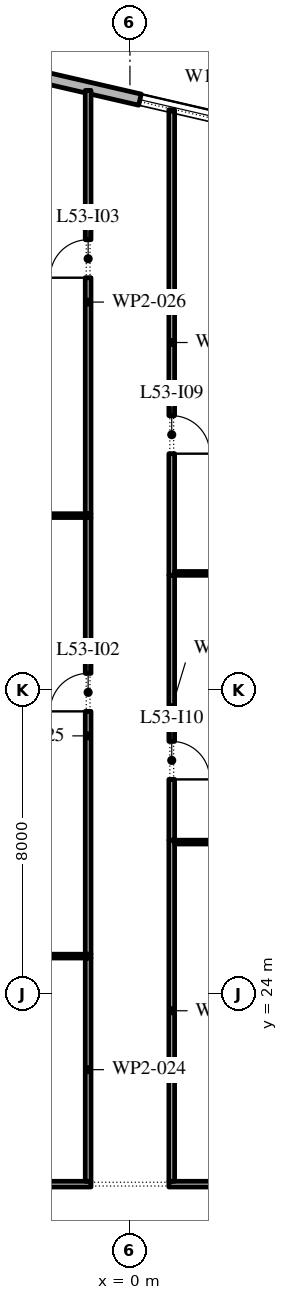
"""IFC4 building model, lengths in metres.
Left out: names, types, materials, properties, quantities, classifications, styles, units other than length and angle.
Written with IfcOpenShell. Run it as: python <this file> out.ifc"""

import sys

from ifc_helpers import new_model, si_unit, direction, frame, frame_2d, origin, place, context, subcontext, project, spatial, rectangle, extrude, element, fill, save


model = new_model("IFC4")
c1 = context("Model", 3, precision=1e-05, world=origin(), true_north=direction((0.0, 1.0)))
c2 = subcontext(c1, "Body", "Model", "MODEL_VIEW")
j1 = project(units=[si_unit("LENGTHUNIT", "METRE"), si_unit("PLANEANGLEUNIT", "RADIAN")], contexts=[c1])
p1 = place(None, origin())
s1 = spatial("IfcSite", under=j1, at=p1, CompositionType="ELEMENT")
p2 = place(p1, origin())
s2 = spatial("IfcBuilding", under=s1, at=p2, CompositionType="ELEMENT")
p3 = place(p2, frame((0.0, 0.0, 247.2)))
s3 = spatial("IfcBuildingStorey", under=s2, at=p3, CompositionType="ELEMENT", Elevation=247.2)
p4 = place(p3, frame((29.616, 40.758, 0.0), z_axis=(0.0, 0.0, 1.0), x_axis=(-0.974370532314, 0.224949029246, 0.0)))
e1 = element("IfcWall", 1, at=p4, inside=s3, PredefinedType="STANDARD", context=c2, shape_type="SweptSolid", body=[
    extrude(rectangle(XDim=48.0, YDim=0.3, at=frame_2d((24.0, 0.0))), origin(), (0.0, 0.0, 1.0), 4.0),
])
p5 = place(p4, frame((1.625, 0.0, 0.45)))
e2 = element("IfcOpeningElement", 2, at=p5, cuts=e1, PredefinedType="OPENING", context=c2, shape_type="SweptSolid", body=[
    extrude(rectangle(XDim=4.5, YDim=2.675, at=frame_2d((2.25, 1.337))), frame((0.0, 0.16, 0.0), z_axis=(0.0, -1.0, 0.0), x_axis=(1.0, 0.0, 0.0)), (0.0, 0.0, 1.0), 0.32),
])
p6 = place(p4, frame((9.975, 0.0, 0.0)))
e3 = element("IfcOpeningElement", 3, at=p6, cuts=e1, PredefinedType="OPENING", context=c2, shape_type="SweptSolid", body=[
    extrude(rectangle(XDim=2.4, YDim=3.5, at=frame_2d((1.2, 1.75))), frame((0.0, 0.16, 0.0), z_axis=(0.0, -1.0, 0.0), x_axis=(1.0, 0.0, 0.0)), (0.0, 0.0, 1.0), 0.32),
])
p7 = place(p4, frame((17.575, 0.0, 0.45)))
e4 = element("IfcOpeningElement", 4, at=p7, cuts=e1, PredefinedType="OPENING", context=c2, shape_type="SweptSolid", body=[
    extrude(rectangle(XDim=4.5, YDim=2.525, at=frame_2d((2.25, 1.262))), frame((0.0, 0.16, 0.0), z_axis=(0.0, -1.0, 0.0), x_axis=(1.0, 0.0, 0.0)), (0.0, 0.0, 1.0), 0.32),
])
p8 = place(p4, frame((25.625, 0.0, 0.45)))
e5 = element("IfcOpeningElement", 5, at=p8, cuts=e1, PredefinedType="OPENING", context=c2, shape_type="SweptSolid", body=[
    extrude(rectangle(XDim=4.5, YDim=2.45, at=frame_2d((2.25, 1.225))), frame((0.0, 0.16, 0.0), z_axis=(0.0, -1.0, 0.0), x_axis=(1.0, 0.0, 0.0)), (0.0, 0.0, 1.0), 0.32),
])
p9 = place(p4, frame((33.675, 0.0, 0.45)))
e6 = element("IfcOpeningElement", 6, at=p9, cuts=e1, PredefinedType="OPENING", context=c2, shape_type="SweptSolid", body=[
    extrude(rectangle(XDim=4.5, YDim=2.45, at=frame_2d((2.25, 1.225))), frame((0.0, 0.16, 0.0), z_axis=(0.0, -1.0, 0.0), x_axis=(1.0, 0.0, 0.0)), (0.0, 0.0, 1.0), 0.32),
])
p10 = place(p4, frame((42.775, 0.0, 0.0)))
e7 = element("IfcOpeningElement", 7, at=p10, cuts=e1, PredefinedType="OPENING", context=c2, shape_type="SweptSolid", body=[
    extrude(rectangle(XDim=2.4, YDim=3.5, at=frame_2d((1.2, 1.75))), frame((0.0, 0.16, 0.0), z_axis=(0.0, -1.0, 0.0), x_axis=(1.0, 0.0, 0.0)), (0.0, 0.0, 1.0), 0.32),
])
p11 = place(p3, frame((-9.29, 36.59, 0.0), z_axis=(0.0, 0.0, 1.0), x_axis=(1.0, 0.0, 0.0)))
e8 = element("IfcWall", 8, at=p11, inside=s3, PredefinedType="PARTITIONING", context=c2, shape_type="SweptSolid", body=[
    extrude(rectangle(XDim=8.265, YDim=0.1, at=frame_2d((4.133, 0.0))), origin(), (0.0, 0.0, 1.0), 4.0),
])
p12 = place(p3, frame((-8.075, 19.0, 0.0), z_axis=(0.0, 0.0, 1.0), x_axis=(1.0, 0.0, 0.0)))
e9 = element("IfcWall", 9, at=p12, inside=s3, PredefinedType="PARTITIONING", context=c2, shape_type="SweptSolid", body=[
    extrude(rectangle(XDim=7.05, YDim=0.15, at=frame_2d((3.525, 0.0))), origin(), (0.0, 0.0, 1.0), 4.0),
])
p13 = place(p12, frame((3.075, 0.0, 0.0)))
e10 = element("IfcOpeningElement", 10, at=p13, cuts=e9, PredefinedType="OPENING", context=c2, shape_type="SweptSolid", body=[
    extrude(rectangle(XDim=1.0, YDim=2.1, at=frame_2d((0.5, 1.05))), frame((0.0, 0.085, 0.0), z_axis=(0.0, -1.0, 0.0), x_axis=(1.0, 0.0, 0.0)), (0.0, 0.0, 1.0), 0.17),
])
p14 = place(p3, frame((-7.925, 25.0, 0.0), z_axis=(0.0, 0.0, 1.0), x_axis=(1.0, 0.0, 0.0)))
e11 = element("IfcWall", 11, at=p14, inside=s3, PredefinedType="PARTITIONING", context=c2, shape_type="SweptSolid", body=[
    extrude(rectangle(XDim=6.9, YDim=0.1, at=frame_2d((3.45, 0.0))), origin(), (0.0, 0.0, 1.0), 4.0),
])
p15 = place(p3, frame((-1.1, 19.075, 0.0), z_axis=(0.0, 0.0, 1.0), x_axis=(0.0, 1.0, 0.0)))
e12 = element("IfcWall", 12, at=p15, inside=s3, PredefinedType="PARTITIONING", context=c2, shape_type="SweptSolid", body=[
    extrude(rectangle(XDim=5.875, YDim=0.15, at=frame_2d((2.938, 0.0))), origin(), (0.0, 0.0, 1.0), 4.0),
])
p16 = place(p3, frame((-1.1, 25.05, 0.0), z_axis=(0.0, 0.0, 1.0), x_axis=(0.0, 1.0, 0.0)))
e13 = element("IfcWall", 13, at=p16, inside=s3, PredefinedType="PARTITIONING", context=c2, shape_type="SweptSolid", body=[
    extrude(rectangle(XDim=11.49, YDim=0.15, at=frame_2d((5.745, 0.0))), origin(), (0.0, 0.0, 1.0), 4.0),
])
p17 = place(p16, frame((6.39, 0.0, 0.0)))
e14 = element("IfcOpeningElement", 14, at=p17, cuts=e13, PredefinedType="OPENING", context=c2, shape_type="SweptSolid", body=[
    extrude(rectangle(XDim=1.0, YDim=2.1, at=frame_2d((0.5, 1.05))), frame((0.0, 0.085, 0.0), z_axis=(0.0, -1.0, 0.0), x_axis=(1.0, 0.0, 0.0)), (0.0, 0.0, 1.0), 0.17),
])
p18 = place(p3, frame((-1.1, 36.64, 0.0), z_axis=(0.0, 0.0, 1.0), x_axis=(0.0, 1.0, 0.0)))
e15 = element("IfcWall", 15, at=p18, inside=s3, PredefinedType="PARTITIONING", context=c2, shape_type="SweptSolid", body=[
    extrude(rectangle(XDim=11.138, YDim=0.15, at=frame_2d((5.569, 0.0))), origin(), (0.0, 0.0, 1.0), 4.0),
])
p19 = place(p18, frame((6.21, 0.0, 0.0)))
e16 = element("IfcOpeningElement", 16, at=p19, cuts=e15, PredefinedType="OPENING", context=c2, shape_type="SweptSolid", body=[
    extrude(rectangle(XDim=1.0, YDim=2.1, at=frame_2d((0.5, 1.05))), frame((0.0, 0.085, 0.0), z_axis=(0.0, -1.0, 0.0), x_axis=(1.0, 0.0, 0.0)), (0.0, 0.0, 1.0), 0.17),
])
p20 = place(p3, frame((1.025, 19.0, 0.0), z_axis=(0.0, 0.0, 1.0), x_axis=(1.0, 0.0, 0.0)))
e17 = element("IfcWall", 17, at=p20, inside=s3, PredefinedType="PARTITIONING", context=c2, shape_type="SweptSolid", body=[
    extrude(rectangle(XDim=7.05, YDim=0.15, at=frame_2d((3.525, 0.0))), origin(), (0.0, 0.0, 1.0), 4.0),
])
p21 = place(p3, frame((1.1, 28.05, 0.0), z_axis=(0.0, 0.0, 1.0), x_axis=(0.0, -1.0, 0.0)))
e18 = element("IfcWall", 18, at=p21, inside=s3, PredefinedType="PARTITIONING", context=c2, shape_type="SweptSolid", body=[
    extrude(rectangle(XDim=8.975, YDim=0.15, at=frame_2d((4.488, 0.0))), origin(), (0.0, 0.0, 1.0), 4.0),
])
p22 = place(p3, frame((1.175, 28.0, 0.0), z_axis=(0.0, 0.0, 1.0), x_axis=(1.0, 0.0, 0.0)))
e19 = element("IfcWall", 19, at=p22, inside=s3, PredefinedType="PARTITIONING", context=c2, shape_type="SweptSolid", body=[
    extrude(rectangle(XDim=6.9, YDim=0.1, at=frame_2d((3.45, 0.0))), origin(), (0.0, 0.0, 1.0), 4.0),
])
p23 = place(p3, frame((1.1, 35.02, 0.0), z_axis=(0.0, 0.0, 1.0), x_axis=(0.0, -1.0, 0.0)))
e20 = element("IfcWall", 20, at=p23, inside=s3, PredefinedType="PARTITIONING", context=c2, shape_type="SweptSolid", body=[
    extrude(rectangle(XDim=6.97, YDim=0.15, at=frame_2d((3.485, 0.0))), origin(), (0.0, 0.0, 1.0), 4.0),
])
p24 = place(p23, frame((4.37, 0.0, 0.0)))
e21 = element("IfcOpeningElement", 21, at=p24, cuts=e20, PredefinedType="OPENING", context=c2, shape_type="SweptSolid", body=[
    extrude(rectangle(XDim=1.0, YDim=2.1, at=frame_2d((0.5, 1.05))), frame((0.0, 0.085, 0.0), z_axis=(0.0, -1.0, 0.0), x_axis=(1.0, 0.0, 0.0)), (0.0, 0.0, 1.0), 0.17),
])
p25 = place(p3, frame((1.1, 47.27, 0.0), z_axis=(0.0, 0.0, 1.0), x_axis=(0.0, -1.0, 0.0)))
e22 = element("IfcWall", 22, at=p25, inside=s3, PredefinedType="PARTITIONING", context=c2, shape_type="SweptSolid", body=[
    extrude(rectangle(XDim=12.25, YDim=0.15, at=frame_2d((6.125, 0.0))), origin(), (0.0, 0.0, 1.0), 4.0),
])
p26 = place(p25, frame((8.05, 0.0, 0.0)))
e23 = element("IfcOpeningElement", 23, at=p26, cuts=e22, PredefinedType="OPENING", context=c2, shape_type="SweptSolid", body=[
    extrude(rectangle(XDim=1.0, YDim=2.1, at=frame_2d((0.5, 1.05))), frame((0.0, 0.085, 0.0), z_axis=(0.0, -1.0, 0.0), x_axis=(1.0, 0.0, 0.0)), (0.0, 0.0, 1.0), 0.17),
])
p27 = place(p3, frame((7.935, 35.07, 0.0), z_axis=(0.0, 0.0, 1.0), x_axis=(-1.0, 0.0, 0.0)))
e24 = element("IfcWall", 24, at=p27, inside=s3, PredefinedType="PARTITIONING", context=c2, shape_type="SweptSolid", body=[
    extrude(rectangle(XDim=6.76, YDim=0.1, at=frame_2d((3.38, 0.0))), origin(), (0.0, 0.0, 1.0), 4.0),
])
p28 = place(p8, origin())
e25 = element("IfcWindow", 25, at=p28, inside=s3, PartitioningType="DOUBLE_PANEL_VERTICAL", PredefinedType="WINDOW", context=c2, shape_type="SweptSolid", body=[
    extrude(rectangle(XDim=4.5, YDim=2.45, at=frame_2d((2.25, 1.225))), frame((0.0, 0.03, 0.0), z_axis=(0.0, -1.0, 0.0), x_axis=(1.0, 0.0, 0.0)), (0.0, 0.0, 1.0), 0.06),
])
fill(e5, e25)
p29 = place(p17, origin())
e26 = element("IfcDoor", 26, at=p29, inside=s3, OperationType="SINGLE_SWING_RIGHT", PredefinedType="DOOR", context=c2, shape_type="SweptSolid", body=[
    extrude(rectangle(XDim=1.0, YDim=2.1, at=frame_2d((0.5, 1.05))), frame((0.0, 0.025, 0.0), z_axis=(0.0, -1.0, 0.0), x_axis=(1.0, 0.0, 0.0)), (0.0, 0.0, 1.0), 0.05),
])
fill(e14, e26)
p30 = place(p19, origin())
e27 = element("IfcDoor", 27, at=p30, inside=s3, OperationType="SINGLE_SWING_RIGHT", PredefinedType="DOOR", context=c2, shape_type="SweptSolid", body=[
    extrude(rectangle(XDim=1.0, YDim=2.1, at=frame_2d((0.5, 1.05))), frame((0.0, 0.025, 0.0), z_axis=(0.0, -1.0, 0.0), x_axis=(1.0, 0.0, 0.0)), (0.0, 0.0, 1.0), 0.05),
])
fill(e16, e27)
p31 = place(p26, origin())
e28 = element("IfcDoor", 28, at=p31, inside=s3, OperationType="SINGLE_SWING_LEFT", PredefinedType="DOOR", context=c2, shape_type="SweptSolid", body=[
    extrude(rectangle(XDim=1.0, YDim=2.1, at=frame_2d((0.5, 1.05))), frame((0.0, 0.025, 0.0), z_axis=(0.0, -1.0, 0.0), x_axis=(1.0, 0.0, 0.0)), (0.0, 0.0, 1.0), 0.05),
])
fill(e23, e28)
p32 = place(p24, origin())
e29 = element("IfcDoor", 29, at=p32, inside=s3, OperationType="SINGLE_SWING_LEFT", PredefinedType="DOOR", context=c2, shape_type="SweptSolid", body=[
    extrude(rectangle(XDim=1.0, YDim=2.1, at=frame_2d((0.5, 1.05))), frame((0.0, 0.025, 0.0), z_axis=(0.0, -1.0, 0.0), x_axis=(1.0, 0.0, 0.0)), (0.0, 0.0, 1.0), 0.05),
])
fill(e21, e29)
save(model, sys.argv[1])
